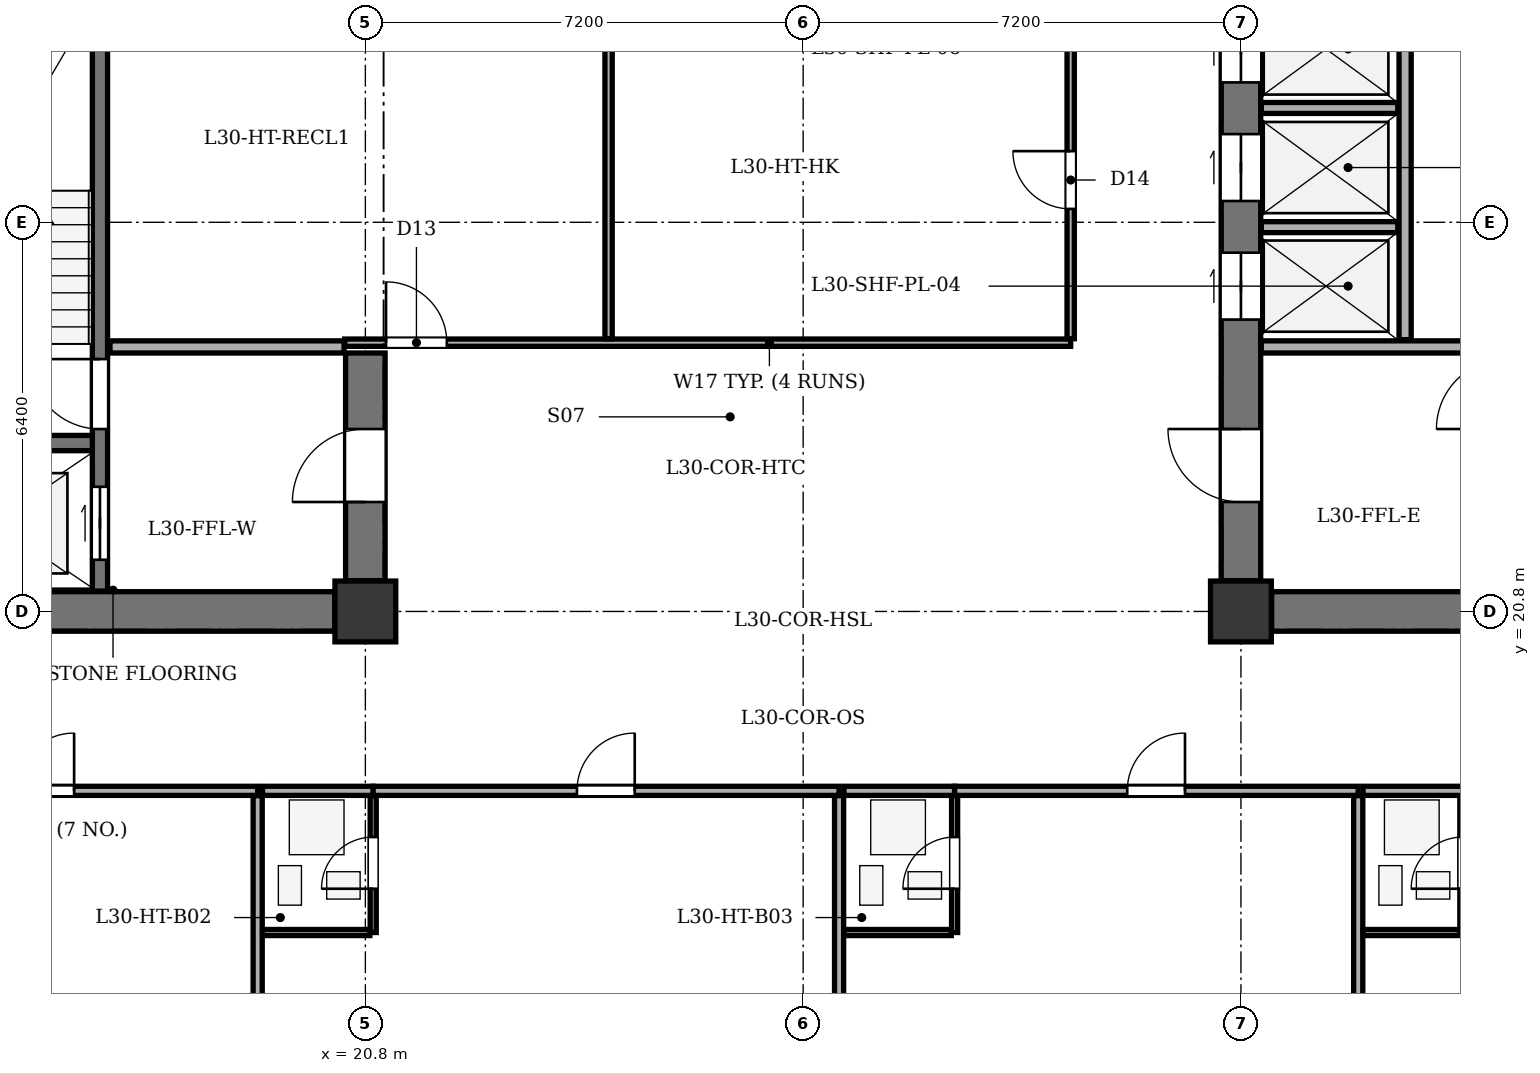
"""IFC4 building model, lengths in metres.
Left out: names, types, materials, properties, quantities, classifications, styles, units other than length and angle.
Written with IfcOpenShell. Run it as: python <this file> out.ifc"""

import sys

from ifc_helpers import new_model, si_unit, direction, frame, frame_2d, origin, origin_2d, place, context, subcontext, project, spatial, rectangle, extrude, element, fill, save


model = new_model("IFC4")
c1 = context("Model", 3, precision=1e-05, world=origin(), true_north=direction((0.0, 1.0)))
c2 = subcontext(c1, "Body", "Model", "MODEL_VIEW")
j1 = project(units=[si_unit("LENGTHUNIT", "METRE"), si_unit("PLANEANGLEUNIT", "RADIAN")], contexts=[c1])
p1 = place(None, origin())
s1 = spatial("IfcSite", under=j1, at=p1, CompositionType="ELEMENT")
p2 = place(p1, origin())
s2 = spatial("IfcBuilding", under=s1, at=p2, CompositionType="ELEMENT")
p3 = place(p2, frame((0.0, 0.0, 123.8)))
s3 = spatial("IfcBuildingStorey", under=s2, at=p3, CompositionType="ELEMENT", Elevation=123.8)
for number, where, z_axis, x_axis in (
    (1, (20.8, 20.8, 0.0), (0.0, 0.0, 1.0), (1.0, 0.0, 0.0)),
    (2, (35.2, 20.8, 0.0), (0.0, 0.0, 1.0), (1.0, 0.0, 0.0)),
):
    element("IfcColumn", number, at=place(p3, frame(where, z_axis=z_axis, x_axis=x_axis)), inside=s3, PredefinedType="COLUMN", context=c2, shape_type="SweptSolid", body=[
        extrude(rectangle(XDim=1.0, YDim=1.0, at=origin_2d()), origin(), (0.0, 0.0, 1.0), 3.5),
    ])
p4 = place(p3, frame((13.305, 20.8, 0.0), z_axis=(0.0, 0.0, 1.0), x_axis=(1.0, 0.0, 0.0)))
e3 = element("IfcWall", 3, at=p4, inside=s3, PredefinedType="SHEAR", context=c2, shape_type="SweptSolid", body=[
    extrude(rectangle(XDim=6.99, YDim=0.65, at=frame_2d((3.495, 0.0))), origin(), (0.0, 0.0, 1.0), 3.2),
])
p5 = place(p3, frame((20.8, 21.305, 0.0), z_axis=(0.0, 0.0, 1.0), x_axis=(0.0, 1.0, 0.0)))
e4 = element("IfcWall", 4, at=p5, inside=s3, PredefinedType="SHEAR", context=c2, shape_type="SweptSolid", body=[
    extrude(rectangle(XDim=3.745, YDim=0.65, at=frame_2d((1.873, 0.0))), origin(), (0.0, 0.0, 1.0), 3.2),
])
p6 = place(p5, frame((1.295, 0.0, 0.0)))
e5 = element("IfcOpeningElement", 5, at=p6, cuts=e4, PredefinedType="OPENING", context=c2, shape_type="SweptSolid", body=[
    extrude(rectangle(XDim=1.2, YDim=2.15, at=frame_2d((0.6, 1.075))), frame((0.0, 0.335, 0.0), z_axis=(0.0, -1.0, 0.0), x_axis=(1.0, 0.0, 0.0)), (0.0, 0.0, 1.0), 0.67),
])
p7 = place(p3, frame((16.435, 21.135, 0.0), z_axis=(0.0, 0.0, 1.0), x_axis=(0.0, 1.0, 0.0)))
e6 = element("IfcWall", 6, at=p7, inside=s3, PredefinedType="SHEAR", context=c2, shape_type="SweptSolid", body=[
    extrude(rectangle(XDim=12.13, YDim=0.25, at=frame_2d((6.065, 0.0))), origin(), (0.0, 0.0, 1.0), 3.2),
])
p8 = place(p7, frame((0.515, 0.0, 0.0)))
e7 = element("IfcOpeningElement", 7, at=p8, cuts=e6, PredefinedType="OPENING", context=c2, shape_type="SweptSolid", body=[
    extrude(rectangle(XDim=1.2, YDim=2.15, at=frame_2d((0.6, 1.075))), frame((0.0, 0.135, 0.0), z_axis=(0.0, -1.0, 0.0), x_axis=(1.0, 0.0, 0.0)), (0.0, 0.0, 1.0), 0.27),
])
p9 = place(p7, frame((2.665, 0.0, 0.0)))
e8 = element("IfcOpeningElement", 8, at=p9, cuts=e6, PredefinedType="OPENING", context=c2, shape_type="SweptSolid", body=[
    extrude(rectangle(XDim=1.15, YDim=2.15, at=frame_2d((0.575, 1.075))), frame((0.0, 0.135, 0.0), z_axis=(0.0, -1.0, 0.0), x_axis=(1.0, 0.0, 0.0)), (0.0, 0.0, 1.0), 0.27),
])
p10 = place(p3, frame((13.135, 23.57, 0.0), z_axis=(0.0, 0.0, 1.0), x_axis=(1.0, 0.0, 0.0)))
e9 = element("IfcWall", 9, at=p10, inside=s3, PredefinedType="SHEAR", context=c2, shape_type="SweptSolid", body=[
    extrude(rectangle(XDim=3.175, YDim=0.25, at=frame_2d((1.587, 0.0))), origin(), (0.0, 0.0, 1.0), 3.2),
])
p11 = place(p3, frame((16.6, 25.15, 0.0), z_axis=(0.0, 0.0, 1.0), x_axis=(1.0, 0.0, 0.0)))
e10 = element("IfcWall", 10, at=p11, inside=s3, PredefinedType="SOLIDWALL", context=c2, shape_type="SweptSolid", body=[
    extrude(rectangle(XDim=3.85, YDim=0.2, at=frame_2d((1.925, 0.0))), origin(), (0.0, 0.0, 1.0), 3.2),
])
p12 = place(p3, frame((35.705, 20.8, 0.0), z_axis=(0.0, 0.0, 1.0), x_axis=(1.0, 0.0, 0.0)))
e11 = element("IfcWall", 11, at=p12, inside=s3, PredefinedType="SHEAR", context=c2, shape_type="SweptSolid", body=[
    extrude(rectangle(XDim=6.99, YDim=0.65, at=frame_2d((3.495, 0.0))), origin(), (0.0, 0.0, 1.0), 3.2),
])
p13 = place(p3, frame((35.2, 21.305, 0.0), z_axis=(0.0, 0.0, 1.0), x_axis=(0.0, 1.0, 0.0)))
e12 = element("IfcWall", 12, at=p13, inside=s3, PredefinedType="SHEAR", context=c2, shape_type="SweptSolid", body=[
    extrude(rectangle(XDim=11.79, YDim=0.65, at=frame_2d((5.895, 0.0))), origin(), (0.0, 0.0, 1.0), 3.2),
])
p14 = place(p13, frame((1.295, 0.0, 0.0)))
e13 = element("IfcOpeningElement", 13, at=p14, cuts=e12, PredefinedType="OPENING", context=c2, shape_type="SweptSolid", body=[
    extrude(rectangle(XDim=1.2, YDim=2.15, at=frame_2d((0.6, 1.075))), frame((0.0, 0.335, 0.0), z_axis=(0.0, -1.0, 0.0), x_axis=(1.0, 0.0, 0.0)), (0.0, 0.0, 1.0), 0.67),
])
p15 = place(p13, frame((4.295, 0.0, 0.0)))
e14 = element("IfcOpeningElement", 14, at=p15, cuts=e12, PredefinedType="OPENING", context=c2, shape_type="SweptSolid", body=[
    extrude(rectangle(XDim=1.1, YDim=2.1, at=frame_2d((0.55, 1.05))), frame((0.0, 0.335, 0.0), z_axis=(0.0, -1.0, 0.0), x_axis=(1.0, 0.0, 0.0)), (0.0, 0.0, 1.0), 0.67),
])
p16 = place(p13, frame((6.245, 0.0, 0.0)))
e15 = element("IfcOpeningElement", 15, at=p16, cuts=e12, PredefinedType="OPENING", context=c2, shape_type="SweptSolid", body=[
    extrude(rectangle(XDim=1.1, YDim=2.1, at=frame_2d((0.55, 1.05))), frame((0.0, 0.335, 0.0), z_axis=(0.0, -1.0, 0.0), x_axis=(1.0, 0.0, 0.0)), (0.0, 0.0, 1.0), 0.67),
])
p17 = place(p13, frame((8.195, 0.0, 0.0)))
e16 = element("IfcOpeningElement", 16, at=p17, cuts=e12, PredefinedType="OPENING", context=c2, shape_type="SweptSolid", body=[
    extrude(rectangle(XDim=1.1, YDim=2.1, at=frame_2d((0.55, 1.05))), frame((0.0, 0.335, 0.0), z_axis=(0.0, -1.0, 0.0), x_axis=(1.0, 0.0, 0.0)), (0.0, 0.0, 1.0), 0.67),
])
p18 = place(p3, frame((35.535, 25.15, 0.0), z_axis=(0.0, 0.0, 1.0), x_axis=(1.0, 0.0, 0.0)))
e17 = element("IfcWall", 17, at=p18, inside=s3, PredefinedType="SOLIDWALL", context=c2, shape_type="SweptSolid", body=[
    extrude(rectangle(XDim=3.865, YDim=0.2, at=frame_2d((1.933, 0.0))), origin(), (0.0, 0.0, 1.0), 3.2),
])
p19 = place(p3, frame((37.9, 25.27, 0.0), z_axis=(0.0, 0.0, 1.0), x_axis=(0.0, 1.0, 0.0)))
e18 = element("IfcWall", 18, at=p19, inside=s3, PredefinedType="SOLIDWALL", context=c2, shape_type="SweptSolid", body=[
    extrude(rectangle(XDim=7.995, YDim=0.2, at=frame_2d((3.998, 0.0))), origin(), (0.0, 0.0, 1.0), 3.2),
])
for number, where, z_axis, x_axis in (
    (19, (35.535, 27.12, 0.0), (0.0, 0.0, 1.0), (1.0, 0.0, 0.0)),
    (20, (35.535, 29.08, 0.0), (0.0, 0.0, 1.0), (1.0, 0.0, 0.0)),
):
    element("IfcWall", number, at=place(p3, frame(where, z_axis=z_axis, x_axis=x_axis)), inside=s3, PredefinedType="PARTITIONING", context=c2, shape_type="SweptSolid", body=[
        extrude(rectangle(XDim=2.245, YDim=0.18, at=frame_2d((1.123, 0.0))), origin(), (0.0, 0.0, 1.0), 3.2),
    ])
p20 = place(p3, frame((20.46, 25.22, 0.0), z_axis=(0.0, 0.0, 1.0), x_axis=(1.0, 0.0, 0.0)))
e21 = element("IfcWall", 21, at=p20, inside=s3, PredefinedType="PARTITIONING", context=c2, shape_type="SweptSolid", body=[
    extrude(rectangle(XDim=11.94, YDim=0.12, at=frame_2d((5.97, 0.0))), origin(), (0.0, 0.0, 1.0), 3.2),
])
p21 = place(p20, frame((0.68, 0.0, 0.0)))
e22 = element("IfcOpeningElement", 22, at=p21, cuts=e21, PredefinedType="OPENING", context=c2, shape_type="SweptSolid", body=[
    extrude(rectangle(XDim=1.0, YDim=2.1, at=frame_2d((0.5, 1.05))), frame((0.0, 0.07, 0.0), z_axis=(0.0, -1.0, 0.0), x_axis=(1.0, 0.0, 0.0)), (0.0, 0.0, 1.0), 0.14),
])
p22 = place(p3, frame((32.4, 25.285, 0.0), z_axis=(0.0, 0.0, 1.0), x_axis=(0.0, 1.0, 0.0)))
e23 = element("IfcWall", 23, at=p22, inside=s3, PredefinedType="PARTITIONING", context=c2, shape_type="SweptSolid", body=[
    extrude(rectangle(XDim=5.67, YDim=0.12, at=frame_2d((2.835, 0.0))), origin(), (0.0, 0.0, 1.0), 3.2),
])
p23 = place(p22, frame((2.135, 0.0, 0.0)))
e24 = element("IfcOpeningElement", 24, at=p23, cuts=e23, PredefinedType="OPENING", context=c2, shape_type="SweptSolid", body=[
    extrude(rectangle(XDim=0.95, YDim=2.1, at=frame_2d((0.475, 1.05))), frame((0.0, 0.07, 0.0), z_axis=(0.0, -1.0, 0.0), x_axis=(1.0, 0.0, 0.0)), (0.0, 0.0, 1.0), 0.14),
])
p24 = place(p3, frame((24.8, 25.285, 0.0), z_axis=(0.0, 0.0, 1.0), x_axis=(0.0, 1.0, 0.0)))
e25 = element("IfcWall", 25, at=p24, inside=s3, PredefinedType="PARTITIONING", context=c2, shape_type="SweptSolid", body=[
    extrude(rectangle(XDim=5.67, YDim=0.12, at=frame_2d((2.835, 0.0))), origin(), (0.0, 0.0, 1.0), 3.2),
])
p25 = place(p3, frame((12.05, 17.85, 0.0), z_axis=(0.0, 0.0, 1.0), x_axis=(1.0, 0.0, 0.0)))
e26 = element("IfcWall", 26, at=p25, inside=s3, PredefinedType="PARTITIONING", context=c2, shape_type="SweptSolid", body=[
    extrude(rectangle(XDim=6.979, YDim=0.15, at=frame_2d((3.49, 0.0))), origin(), (0.0, 0.0, 1.0), 3.2),
])
p26 = place(p25, frame((3.01, 0.0, 0.0)))
e27 = element("IfcOpeningElement", 27, at=p26, cuts=e26, PredefinedType="OPENING", context=c2, shape_type="SweptSolid", body=[
    extrude(rectangle(XDim=0.95, YDim=2.1, at=frame_2d((0.475, 1.05))), frame((0.0, 0.085, 0.0), z_axis=(0.0, -1.0, 0.0), x_axis=(1.0, 0.0, 0.0)), (0.0, 0.0, 1.0), 0.17),
])
p27 = place(p3, frame((19.029, 1.875, 0.0), z_axis=(0.0, 0.0, 1.0), x_axis=(0.0, 1.0, 0.0)))
e28 = element("IfcWall", 28, at=p27, inside=s3, PredefinedType="PARTITIONING", context=c2, shape_type="SweptSolid", body=[
    extrude(rectangle(XDim=15.895, YDim=0.15, at=frame_2d((7.948, 0.0))), origin(), (0.0, 0.0, 1.0), 3.2),
])
p28 = place(p3, frame((19.109, 17.85, 0.0), z_axis=(0.0, 0.0, 1.0), x_axis=(1.0, 0.0, 0.0)))
e29 = element("IfcWall", 29, at=p28, inside=s3, PredefinedType="PARTITIONING", context=c2, shape_type="SweptSolid", body=[
    extrude(rectangle(XDim=1.82, YDim=0.15, at=frame_2d((0.91, 0.0))), origin(), (0.0, 0.0, 1.0), 3.2),
])
p29 = place(p3, frame((20.929, 17.85, 0.0), z_axis=(0.0, 0.0, 1.0), x_axis=(1.0, 0.0, 0.0)))
e30 = element("IfcWall", 30, at=p29, inside=s3, PredefinedType="PARTITIONING", context=c2, shape_type="SweptSolid", body=[
    extrude(rectangle(XDim=7.662, YDim=0.15, at=frame_2d((3.831, 0.0))), origin(), (0.0, 0.0, 1.0), 3.2),
])
p30 = place(p29, frame((3.351, 0.0, 0.0)))
e31 = element("IfcOpeningElement", 31, at=p30, cuts=e30, PredefinedType="OPENING", context=c2, shape_type="SweptSolid", body=[
    extrude(rectangle(XDim=0.95, YDim=2.1, at=frame_2d((0.475, 1.05))), frame((0.0, 0.085, 0.0), z_axis=(0.0, -1.0, 0.0), x_axis=(1.0, 0.0, 0.0)), (0.0, 0.0, 1.0), 0.17),
])
p31 = place(p3, frame((20.929, 15.52, 0.0), z_axis=(0.0, 0.0, 1.0), x_axis=(0.0, 1.0, 0.0)))
e32 = element("IfcWall", 32, at=p31, inside=s3, PredefinedType="PARTITIONING", context=c2, shape_type="SweptSolid", body=[
    extrude(rectangle(XDim=2.25, YDim=0.1, at=frame_2d((1.125, 0.0))), origin(), (0.0, 0.0, 1.0), 2.535),
])
p32 = place(p31, frame((0.72, 0.0, 0.0)))
e33 = element("IfcOpeningElement", 33, at=p32, cuts=e32, PredefinedType="OPENING", context=c2, shape_type="SweptSolid", body=[
    extrude(rectangle(XDim=0.85, YDim=2.05, at=frame_2d((0.425, 1.025))), frame((0.0, 0.06, 0.0), z_axis=(0.0, -1.0, 0.0), x_axis=(1.0, 0.0, 0.0)), (0.0, 0.0, 1.0), 0.12),
])
p33 = place(p3, frame((19.109, 15.52, 0.0), z_axis=(0.0, 0.0, 1.0), x_axis=(1.0, 0.0, 0.0)))
e34 = element("IfcWall", 34, at=p33, inside=s3, PredefinedType="PARTITIONING", context=c2, shape_type="SweptSolid", body=[
    extrude(rectangle(XDim=1.765, YDim=0.1, at=frame_2d((0.883, 0.0))), origin(), (0.0, 0.0, 1.0), 3.2),
])
p34 = place(p3, frame((28.591, 1.875, 0.0), z_axis=(0.0, 0.0, 1.0), x_axis=(0.0, 1.0, 0.0)))
e35 = element("IfcWall", 35, at=p34, inside=s3, PredefinedType="PARTITIONING", context=c2, shape_type="SweptSolid", body=[
    extrude(rectangle(XDim=15.895, YDim=0.15, at=frame_2d((7.948, 0.0))), origin(), (0.0, 0.0, 1.0), 3.2),
])
p35 = place(p3, frame((28.671, 17.85, 0.0), z_axis=(0.0, 0.0, 1.0), x_axis=(1.0, 0.0, 0.0)))
e36 = element("IfcWall", 36, at=p35, inside=s3, PredefinedType="PARTITIONING", context=c2, shape_type="SweptSolid", body=[
    extrude(rectangle(XDim=1.82, YDim=0.15, at=frame_2d((0.91, 0.0))), origin(), (0.0, 0.0, 1.0), 3.2),
])
p36 = place(p3, frame((30.491, 17.85, 0.0), z_axis=(0.0, 0.0, 1.0), x_axis=(1.0, 0.0, 0.0)))
e37 = element("IfcWall", 37, at=p36, inside=s3, PredefinedType="PARTITIONING", context=c2, shape_type="SweptSolid", body=[
    extrude(rectangle(XDim=6.638, YDim=0.15, at=frame_2d((3.319, 0.0))), origin(), (0.0, 0.0, 1.0), 3.2),
])
p37 = place(p36, frame((2.839, 0.0, 0.0)))
e38 = element("IfcOpeningElement", 38, at=p37, cuts=e37, PredefinedType="OPENING", context=c2, shape_type="SweptSolid", body=[
    extrude(rectangle(XDim=0.95, YDim=2.1, at=frame_2d((0.475, 1.05))), frame((0.0, 0.085, 0.0), z_axis=(0.0, -1.0, 0.0), x_axis=(1.0, 0.0, 0.0)), (0.0, 0.0, 1.0), 0.17),
])
p38 = place(p3, frame((30.491, 15.52, 0.0), z_axis=(0.0, 0.0, 1.0), x_axis=(0.0, 1.0, 0.0)))
e39 = element("IfcWall", 39, at=p38, inside=s3, PredefinedType="PARTITIONING", context=c2, shape_type="SweptSolid", body=[
    extrude(rectangle(XDim=2.25, YDim=0.1, at=frame_2d((1.125, 0.0))), origin(), (0.0, 0.0, 1.0), 3.2),
])
p39 = place(p38, frame((0.72, 0.0, 0.0)))
e40 = element("IfcOpeningElement", 40, at=p39, cuts=e39, PredefinedType="OPENING", context=c2, shape_type="SweptSolid", body=[
    extrude(rectangle(XDim=0.85, YDim=2.05, at=frame_2d((0.425, 1.025))), frame((0.0, 0.06, 0.0), z_axis=(0.0, -1.0, 0.0), x_axis=(1.0, 0.0, 0.0)), (0.0, 0.0, 1.0), 0.12),
])
p40 = place(p3, frame((28.671, 15.52, 0.0), z_axis=(0.0, 0.0, 1.0), x_axis=(1.0, 0.0, 0.0)))
e41 = element("IfcWall", 41, at=p40, inside=s3, PredefinedType="PARTITIONING", context=c2, shape_type="SweptSolid", body=[
    extrude(rectangle(XDim=1.765, YDim=0.1, at=frame_2d((0.883, 0.0))), origin(), (0.0, 0.0, 1.0), 3.2),
])
p41 = place(p3, frame((37.129, 1.875, 0.0), z_axis=(0.0, 0.0, 1.0), x_axis=(0.0, 1.0, 0.0)))
e42 = element("IfcWall", 42, at=p41, inside=s3, PredefinedType="PARTITIONING", context=c2, shape_type="SweptSolid", body=[
    extrude(rectangle(XDim=15.895, YDim=0.15, at=frame_2d((7.948, 0.0))), origin(), (0.0, 0.0, 1.0), 3.2),
])
p42 = place(p3, frame((37.209, 17.85, 0.0), z_axis=(0.0, 0.0, 1.0), x_axis=(1.0, 0.0, 0.0)))
e43 = element("IfcWall", 43, at=p42, inside=s3, PredefinedType="PARTITIONING", context=c2, shape_type="SweptSolid", body=[
    extrude(rectangle(XDim=1.641, YDim=0.15, at=frame_2d((0.821, 0.0))), origin(), (0.0, 0.0, 1.0), 3.2),
])
p43 = place(p3, frame((37.209, 15.52, 0.0), z_axis=(0.0, 0.0, 1.0), x_axis=(1.0, 0.0, 0.0)))
e44 = element("IfcWall", 44, at=p43, inside=s3, PredefinedType="PARTITIONING", context=c2, shape_type="SweptSolid", body=[
    extrude(rectangle(XDim=1.586, YDim=0.1, at=frame_2d((0.793, 0.0))), origin(), (0.0, 0.0, 1.0), 3.2),
])
p44 = place(p6, origin())
e45 = element("IfcDoor", 45, at=p44, inside=s3, OperationType="SINGLE_SWING_LEFT", PredefinedType="DOOR", context=c2, shape_type="SweptSolid", body=[
    extrude(rectangle(XDim=1.2, YDim=2.15, at=frame_2d((0.6, 1.075))), frame((0.0, 0.025, 0.0), z_axis=(0.0, -1.0, 0.0), x_axis=(1.0, 0.0, 0.0)), (0.0, 0.0, 1.0), 0.05),
])
fill(e5, e45)
p45 = place(p8, origin())
e46 = element("IfcDoor", 46, at=p45, inside=s3, OperationType="DOUBLE_DOOR_SLIDING", PredefinedType="DOOR", context=c2, shape_type="SweptSolid", body=[
    extrude(rectangle(XDim=1.2, YDim=2.15, at=frame_2d((0.6, 1.075))), frame((0.0, 0.025, 0.0), z_axis=(0.0, -1.0, 0.0), x_axis=(1.0, 0.0, 0.0)), (0.0, 0.0, 1.0), 0.05),
])
fill(e7, e46)
p46 = place(p9, origin())
e47 = element("IfcDoor", 47, at=p46, inside=s3, OperationType="SINGLE_SWING_RIGHT", PredefinedType="DOOR", context=c2, shape_type="SweptSolid", body=[
    extrude(rectangle(XDim=1.15, YDim=2.15, at=frame_2d((0.575, 1.075))), frame((0.0, 0.025, 0.0), z_axis=(0.0, -1.0, 0.0), x_axis=(1.0, 0.0, 0.0)), (0.0, 0.0, 1.0), 0.05),
])
fill(e8, e47)
p47 = place(p14, origin())
e48 = element("IfcDoor", 48, at=p47, inside=s3, OperationType="SINGLE_SWING_RIGHT", PredefinedType="DOOR", context=c2, shape_type="SweptSolid", body=[
    extrude(rectangle(XDim=1.2, YDim=2.15, at=frame_2d((0.6, 1.075))), frame((0.0, 0.025, 0.0), z_axis=(0.0, -1.0, 0.0), x_axis=(1.0, 0.0, 0.0)), (0.0, 0.0, 1.0), 0.05),
])
fill(e13, e48)
p48 = place(p15, origin())
e49 = element("IfcDoor", 49, at=p48, inside=s3, OperationType="DOUBLE_DOOR_SLIDING", PredefinedType="DOOR", context=c2, shape_type="SweptSolid", body=[
    extrude(rectangle(XDim=1.1, YDim=2.1, at=frame_2d((0.55, 1.05))), frame((0.0, 0.025, 0.0), z_axis=(0.0, -1.0, 0.0), x_axis=(1.0, 0.0, 0.0)), (0.0, 0.0, 1.0), 0.05),
])
fill(e14, e49)
p49 = place(p16, origin())
e50 = element("IfcDoor", 50, at=p49, inside=s3, OperationType="DOUBLE_DOOR_SLIDING", PredefinedType="DOOR", context=c2, shape_type="SweptSolid", body=[
    extrude(rectangle(XDim=1.1, YDim=2.1, at=frame_2d((0.55, 1.05))), frame((0.0, 0.025, 0.0), z_axis=(0.0, -1.0, 0.0), x_axis=(1.0, 0.0, 0.0)), (0.0, 0.0, 1.0), 0.05),
])
fill(e15, e50)
p50 = place(p17, origin())
e51 = element("IfcDoor", 51, at=p50, inside=s3, OperationType="DOUBLE_DOOR_SLIDING", PredefinedType="DOOR", context=c2, shape_type="SweptSolid", body=[
    extrude(rectangle(XDim=1.1, YDim=2.1, at=frame_2d((0.55, 1.05))), frame((0.0, 0.025, 0.0), z_axis=(0.0, -1.0, 0.0), x_axis=(1.0, 0.0, 0.0)), (0.0, 0.0, 1.0), 0.05),
])
fill(e16, e51)
p51 = place(p21, origin())
e52 = element("IfcDoor", 52, at=p51, inside=s3, OperationType="SINGLE_SWING_LEFT", PredefinedType="DOOR", context=c2, shape_type="SweptSolid", body=[
    extrude(rectangle(XDim=1.0, YDim=2.1, at=frame_2d((0.5, 1.05))), frame((0.0, 0.025, 0.0), z_axis=(0.0, -1.0, 0.0), x_axis=(1.0, 0.0, 0.0)), (0.0, 0.0, 1.0), 0.05),
])
fill(e22, e52)
p52 = place(p23, origin())
e53 = element("IfcDoor", 53, at=p52, inside=s3, OperationType="SINGLE_SWING_RIGHT", PredefinedType="DOOR", context=c2, shape_type="SweptSolid", body=[
    extrude(rectangle(XDim=0.95, YDim=2.1, at=frame_2d((0.475, 1.05))), frame((0.0, 0.025, 0.0), z_axis=(0.0, -1.0, 0.0), x_axis=(1.0, 0.0, 0.0)), (0.0, 0.0, 1.0), 0.05),
])
fill(e24, e53)
p53 = place(p26, origin())
e54 = element("IfcDoor", 54, at=p53, inside=s3, OperationType="SINGLE_SWING_RIGHT", PredefinedType="DOOR", context=c2, shape_type="SweptSolid", body=[
    extrude(rectangle(XDim=0.95, YDim=2.1, at=frame_2d((0.475, 1.05))), frame((0.0, 0.025, 0.0), z_axis=(0.0, -1.0, 0.0), x_axis=(1.0, 0.0, 0.0)), (0.0, 0.0, 1.0), 0.05),
])
fill(e27, e54)
p54 = place(p32, origin())
e55 = element("IfcDoor", 55, at=p54, inside=s3, OperationType="SINGLE_SWING_LEFT", PredefinedType="DOOR", context=c2, shape_type="SweptSolid", body=[
    extrude(rectangle(XDim=0.85, YDim=2.05, at=frame_2d((0.425, 1.025))), frame((0.0, 0.025, 0.0), z_axis=(0.0, -1.0, 0.0), x_axis=(1.0, 0.0, 0.0)), (0.0, 0.0, 1.0), 0.05),
])
fill(e33, e55)
p55 = place(p30, origin())
e56 = element("IfcDoor", 56, at=p55, inside=s3, OperationType="SINGLE_SWING_RIGHT", PredefinedType="DOOR", context=c2, shape_type="SweptSolid", body=[
    extrude(rectangle(XDim=0.95, YDim=2.1, at=frame_2d((0.475, 1.05))), frame((0.0, 0.025, 0.0), z_axis=(0.0, -1.0, 0.0), x_axis=(1.0, 0.0, 0.0)), (0.0, 0.0, 1.0), 0.05),
])
fill(e31, e56)
p56 = place(p39, origin())
e57 = element("IfcDoor", 57, at=p56, inside=s3, OperationType="SINGLE_SWING_LEFT", PredefinedType="DOOR", context=c2, shape_type="SweptSolid", body=[
    extrude(rectangle(XDim=0.85, YDim=2.05, at=frame_2d((0.425, 1.025))), frame((0.0, 0.025, 0.0), z_axis=(0.0, -1.0, 0.0), x_axis=(1.0, 0.0, 0.0)), (0.0, 0.0, 1.0), 0.05),
])
fill(e40, e57)
p57 = place(p37, origin())
e58 = element("IfcDoor", 58, at=p57, inside=s3, OperationType="SINGLE_SWING_RIGHT", PredefinedType="DOOR", context=c2, shape_type="SweptSolid", body=[
    extrude(rectangle(XDim=0.95, YDim=2.1, at=frame_2d((0.475, 1.05))), frame((0.0, 0.025, 0.0), z_axis=(0.0, -1.0, 0.0), x_axis=(1.0, 0.0, 0.0)), (0.0, 0.0, 1.0), 0.05),
])
fill(e38, e58)
save(model, sys.argv[1])
